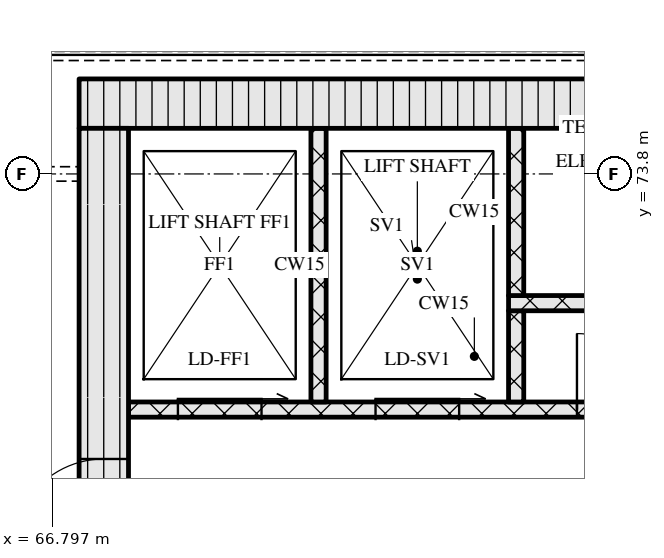
"""IFC4 building model, lengths in metres.
Left out: names, types, materials, properties, quantities, classifications, styles, units other than length and angle.
Written with IfcOpenShell. Run it as: python <this file> out.ifc"""

import sys

from ifc_helpers import new_model, si_unit, direction, frame, frame_2d, origin, place, context, subcontext, project, spatial, rectangle, extrude, element, fill, save


model = new_model("IFC4")
c1 = context("Model", 3, precision=1e-05, world=origin(), true_north=direction((0.0, 1.0)))
c2 = subcontext(c1, "Body", "Model", "MODEL_VIEW")
j1 = project(units=[si_unit("LENGTHUNIT", "METRE"), si_unit("PLANEANGLEUNIT", "RADIAN")], contexts=[c1])
p1 = place(None, origin())
s1 = spatial("IfcSite", under=j1, at=p1, CompositionType="ELEMENT")
p2 = place(p1, origin())
s2 = spatial("IfcBuilding", under=s1, at=p2, CompositionType="ELEMENT")
p3 = place(p2, frame((0.0, 0.0, 248.7)))
s3 = spatial("IfcBuildingStorey", under=s2, at=p3, CompositionType="ELEMENT", Elevation=248.7)
p4 = place(p3, frame((67.15, 74.725, 0.0), z_axis=(0.0, 0.0, 1.0), x_axis=(1.0, 0.0, 0.0)))
e1 = element("IfcWall", 1, at=p4, inside=s3, PredefinedType="SOLIDWALL", context=c2, shape_type="SweptSolid", body=[
    extrude(rectangle(XDim=40.9, YDim=0.65, at=frame_2d((20.45, 0.0))), origin(), (0.0, 0.0, 1.0), 3.3),
])
p5 = place(p3, frame((67.475, 62.4, 0.0), z_axis=(0.0, 0.0, 1.0), x_axis=(0.0, 1.0, 0.0)))
e2 = element("IfcWall", 2, at=p5, inside=s3, PredefinedType="SOLIDWALL", context=c2, shape_type="SweptSolid", body=[
    extrude(rectangle(XDim=12.0, YDim=0.65, at=frame_2d((6.0, 0.0))), origin(), (0.0, 0.0, 1.0), 3.3),
])
p6 = place(p5, frame((6.45, 0.0, 0.0)))
e3 = element("IfcOpeningElement", 3, at=p6, cuts=e2, PredefinedType="OPENING", context=c2, shape_type="SweptSolid", body=[
    extrude(rectangle(XDim=1.2, YDim=2.1, at=frame_2d((0.6, 1.05))), frame((0.0, 0.335, 0.0), z_axis=(0.0, -1.0, 0.0), x_axis=(1.0, 0.0, 0.0)), (0.0, 0.0, 1.0), 0.67),
])
p7 = place(p3, frame((67.8, 70.7, 0.0), z_axis=(0.0, 0.0, 1.0), x_axis=(1.0, 0.0, 0.0)))
e4 = element("IfcWall", 4, at=p7, inside=s3, PredefinedType="SOLIDWALL", context=c2, shape_type="SweptSolid", body=[
    extrude(rectangle(XDim=39.6, YDim=0.2, at=frame_2d((19.8, 0.0))), origin(), (0.0, 0.0, 1.0), 3.3),
])
p8 = place(p7, frame((0.65, 0.0, 0.0)))
e5 = element("IfcOpeningElement", 5, at=p8, cuts=e4, PredefinedType="OPENING", context=c2, shape_type="SweptSolid", body=[
    extrude(rectangle(XDim=1.1, YDim=2.1, at=frame_2d((0.55, 1.05))), frame((0.0, 0.11, 0.0), z_axis=(0.0, -1.0, 0.0), x_axis=(1.0, 0.0, 0.0)), (0.0, 0.0, 1.0), 0.22),
])
p9 = place(p7, frame((3.25, 0.0, 0.0)))
e6 = element("IfcOpeningElement", 6, at=p9, cuts=e4, PredefinedType="OPENING", context=c2, shape_type="SweptSolid", body=[
    extrude(rectangle(XDim=1.1, YDim=2.1, at=frame_2d((0.55, 1.05))), frame((0.0, 0.11, 0.0), z_axis=(0.0, -1.0, 0.0), x_axis=(1.0, 0.0, 0.0)), (0.0, 0.0, 1.0), 0.22),
])
p10 = place(p7, frame((5.9, 0.0, 0.0)))
e7 = element("IfcOpeningElement", 7, at=p10, cuts=e4, PredefinedType="OPENING", context=c2, shape_type="SweptSolid", body=[
    extrude(rectangle(XDim=1.0, YDim=2.1, at=frame_2d((0.5, 1.05))), frame((0.0, 0.11, 0.0), z_axis=(0.0, -1.0, 0.0), x_axis=(1.0, 0.0, 0.0)), (0.0, 0.0, 1.0), 0.22),
])
p11 = place(p7, frame((21.7, 0.0, 0.0)))
e8 = element("IfcOpeningElement", 8, at=p11, cuts=e4, PredefinedType="OPENING", context=c2, shape_type="SweptSolid", body=[
    extrude(rectangle(XDim=1.0, YDim=2.1, at=frame_2d((0.5, 1.05))), frame((0.0, 0.11, 0.0), z_axis=(0.0, -1.0, 0.0), x_axis=(1.0, 0.0, 0.0)), (0.0, 0.0, 1.0), 0.22),
])
p12 = place(p7, frame((32.7, 0.0, 0.0)))
e9 = element("IfcOpeningElement", 9, at=p12, cuts=e4, PredefinedType="OPENING", context=c2, shape_type="SweptSolid", body=[
    extrude(rectangle(XDim=1.0, YDim=2.1, at=frame_2d((0.5, 1.05))), frame((0.0, 0.11, 0.0), z_axis=(0.0, -1.0, 0.0), x_axis=(1.0, 0.0, 0.0)), (0.0, 0.0, 1.0), 0.22),
])
p13 = place(p7, frame((35.25, 0.0, 0.0)))
e10 = element("IfcOpeningElement", 10, at=p13, cuts=e4, PredefinedType="OPENING", context=c2, shape_type="SweptSolid", body=[
    extrude(rectangle(XDim=1.1, YDim=2.1, at=frame_2d((0.55, 1.05))), frame((0.0, 0.11, 0.0), z_axis=(0.0, -1.0, 0.0), x_axis=(1.0, 0.0, 0.0)), (0.0, 0.0, 1.0), 0.22),
])
p14 = place(p7, frame((37.85, 0.0, 0.0)))
e11 = element("IfcOpeningElement", 11, at=p14, cuts=e4, PredefinedType="OPENING", context=c2, shape_type="SweptSolid", body=[
    extrude(rectangle(XDim=1.1, YDim=2.1, at=frame_2d((0.55, 1.05))), frame((0.0, 0.11, 0.0), z_axis=(0.0, -1.0, 0.0), x_axis=(1.0, 0.0, 0.0)), (0.0, 0.0, 1.0), 0.22),
])
p15 = place(p3, frame((70.3, 70.8, 0.0), z_axis=(0.0, 0.0, 1.0), x_axis=(0.0, 1.0, 0.0)))
e12 = element("IfcWall", 12, at=p15, inside=s3, PredefinedType="SOLIDWALL", context=c2, shape_type="SweptSolid", body=[
    extrude(rectangle(XDim=3.6, YDim=0.2, at=frame_2d((1.8, 0.0))), origin(), (0.0, 0.0, 1.0), 3.3),
])
p16 = place(p3, frame((72.9, 70.8, 0.0), z_axis=(0.0, 0.0, 1.0), x_axis=(0.0, 1.0, 0.0)))
e13 = element("IfcWall", 13, at=p16, inside=s3, PredefinedType="SOLIDWALL", context=c2, shape_type="SweptSolid", body=[
    extrude(rectangle(XDim=1.2, YDim=0.2, at=frame_2d((0.6, 0.0))), origin(), (0.0, 0.0, 1.0), 3.3),
])
p17 = place(p3, frame((72.8, 72.1, 0.0), z_axis=(0.0, 0.0, 1.0), x_axis=(1.0, 0.0, 0.0)))
e14 = element("IfcWall", 14, at=p17, inside=s3, PredefinedType="SOLIDWALL", context=c2, shape_type="SweptSolid", body=[
    extrude(rectangle(XDim=11.0, YDim=0.2, at=frame_2d((5.5, 0.0))), origin(), (0.0, 0.0, 1.0), 3.3),
])
p18 = place(p17, frame((1.25, 0.0, 0.0)))
e15 = element("IfcOpeningElement", 15, at=p18, cuts=e14, PredefinedType="OPENING", context=c2, shape_type="SweptSolid", body=[
    extrude(rectangle(XDim=0.9, YDim=2.1, at=frame_2d((0.45, 1.05))), frame((0.0, 0.11, 0.0), z_axis=(0.0, -1.0, 0.0), x_axis=(1.0, 0.0, 0.0)), (0.0, 0.0, 1.0), 0.22),
])
p19 = place(p17, frame((3.85, 0.0, 0.0)))
e16 = element("IfcOpeningElement", 16, at=p19, cuts=e14, PredefinedType="OPENING", context=c2, shape_type="SweptSolid", body=[
    extrude(rectangle(XDim=0.9, YDim=2.1, at=frame_2d((0.45, 1.05))), frame((0.0, 0.11, 0.0), z_axis=(0.0, -1.0, 0.0), x_axis=(1.0, 0.0, 0.0)), (0.0, 0.0, 1.0), 0.22),
])
p20 = place(p17, frame((6.42, 0.0, 0.0)))
e17 = element("IfcOpeningElement", 17, at=p20, cuts=e14, PredefinedType="OPENING", context=c2, shape_type="SweptSolid", body=[
    extrude(rectangle(XDim=0.9, YDim=2.1, at=frame_2d((0.45, 1.05))), frame((0.0, 0.11, 0.0), z_axis=(0.0, -1.0, 0.0), x_axis=(1.0, 0.0, 0.0)), (0.0, 0.0, 1.0), 0.22),
])
p21 = place(p17, frame((9.195, 0.0, 0.0)))
e18 = element("IfcOpeningElement", 18, at=p21, cuts=e14, PredefinedType="OPENING", context=c2, shape_type="SweptSolid", body=[
    extrude(rectangle(XDim=0.9, YDim=2.1, at=frame_2d((0.45, 1.05))), frame((0.0, 0.11, 0.0), z_axis=(0.0, -1.0, 0.0), x_axis=(1.0, 0.0, 0.0)), (0.0, 0.0, 1.0), 0.22),
])
p22 = place(p3, frame((72.9, 72.2, 0.0), z_axis=(0.0, 0.0, 1.0), x_axis=(0.0, 1.0, 0.0)))
e19 = element("IfcWall", 19, at=p22, inside=s3, PredefinedType="SOLIDWALL", context=c2, shape_type="SweptSolid", body=[
    extrude(rectangle(XDim=2.2, YDim=0.2, at=frame_2d((1.1, 0.0))), origin(), (0.0, 0.0, 1.0), 3.3),
])
p23 = place(p6, origin())
e20 = element("IfcDoor", 20, at=p23, inside=s3, OperationType="SINGLE_SWING_LEFT", PredefinedType="DOOR", context=c2, shape_type="SweptSolid", body=[
    extrude(rectangle(XDim=1.2, YDim=2.1, at=frame_2d((0.6, 1.05))), frame((0.0, 0.025, 0.0), z_axis=(0.0, -1.0, 0.0), x_axis=(1.0, 0.0, 0.0)), (0.0, 0.0, 1.0), 0.05),
])
fill(e3, e20)
p24 = place(p8, origin())
e21 = element("IfcDoor", 21, at=p24, inside=s3, OperationType="SLIDING_TO_RIGHT", PredefinedType="DOOR", context=c2, shape_type="SweptSolid", body=[
    extrude(rectangle(XDim=1.1, YDim=2.1, at=frame_2d((0.55, 1.05))), frame((0.0, 0.025, 0.0), z_axis=(0.0, -1.0, 0.0), x_axis=(1.0, 0.0, 0.0)), (0.0, 0.0, 1.0), 0.05),
])
fill(e5, e21)
p25 = place(p9, origin())
e22 = element("IfcDoor", 22, at=p25, inside=s3, OperationType="SLIDING_TO_RIGHT", PredefinedType="DOOR", context=c2, shape_type="SweptSolid", body=[
    extrude(rectangle(XDim=1.1, YDim=2.1, at=frame_2d((0.55, 1.05))), frame((0.0, 0.025, 0.0), z_axis=(0.0, -1.0, 0.0), x_axis=(1.0, 0.0, 0.0)), (0.0, 0.0, 1.0), 0.05),
])
fill(e6, e22)
p26 = place(p10, origin())
e23 = element("IfcDoor", 23, at=p26, inside=s3, OperationType="SINGLE_SWING_LEFT", PredefinedType="DOOR", context=c2, shape_type="SweptSolid", body=[
    extrude(rectangle(XDim=1.0, YDim=2.1, at=frame_2d((0.5, 1.05))), frame((0.0, 0.025, 0.0), z_axis=(0.0, -1.0, 0.0), x_axis=(1.0, 0.0, 0.0)), (0.0, 0.0, 1.0), 0.05),
])
fill(e7, e23)
save(model, sys.argv[1])
